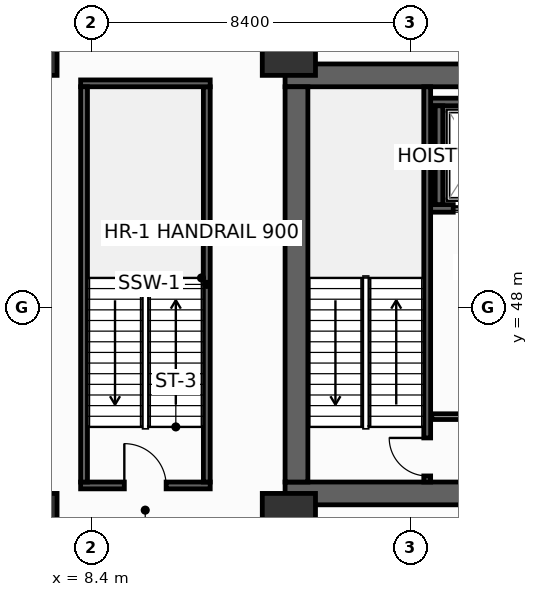
"""IFC4 building model, lengths in metres.
Left out: names, types, materials, properties, quantities, classifications, styles, units other than length and angle.
Written with IfcOpenShell. Run it as: python <this file> out.ifc"""

import sys

from ifc_helpers import new_model, si_unit, direction, frame, frame_2d, origin, origin_2d, place, context, subcontext, project, spatial, rectangle, hollow_rectangle, extrude, element, fill, save


model = new_model("IFC4")
c1 = context("Model", 3, precision=1e-05, world=origin(), true_north=direction((0.0, 1.0)))
c2 = subcontext(c1, "Body", "Model", "MODEL_VIEW")
j1 = project(units=[si_unit("LENGTHUNIT", "METRE"), si_unit("PLANEANGLEUNIT", "RADIAN")], contexts=[c1])
p1 = place(None, origin())
s1 = spatial("IfcSite", under=j1, at=p1, CompositionType="ELEMENT")
p2 = place(p1, origin())
s2 = spatial("IfcBuilding", under=s1, at=p2, CompositionType="ELEMENT")
p3 = place(p2, frame((0.0, 0.0, 22.2)))
s3 = spatial("IfcBuildingStorey", under=s2, at=p3, CompositionType="ELEMENT", Elevation=22.2)
p4 = place(p3, frame((13.5, 43.1, 0.0), z_axis=(0.0, 0.0, 1.0), x_axis=(1.0, 0.0, 0.0)))
e1 = element("IfcWall", 1, at=p4, inside=s3, PredefinedType="SHEAR", context=c2, shape_type="SweptSolid", body=[
    extrude(rectangle(XDim=32.9, YDim=0.6, at=frame_2d((16.45, 0.0))), origin(), (0.0, 0.0, 1.0), 5.15),
])
p5 = place(p4, frame((5.4, 0.0, 0.0)))
e2 = element("IfcOpeningElement", 2, at=p5, cuts=e1, PredefinedType="OPENING", context=c2, shape_type="SweptSolid", body=[
    extrude(rectangle(XDim=1.1, YDim=2.15, at=frame_2d((0.55, 1.075))), frame((0.0, 0.31, 0.0), z_axis=(0.0, -1.0, 0.0), x_axis=(1.0, 0.0, 0.0)), (0.0, 0.0, 1.0), 0.62),
])
p6 = place(p4, frame((25.6, 0.0, 0.0)))
e3 = element("IfcOpeningElement", 3, at=p6, cuts=e1, PredefinedType="OPENING", context=c2, shape_type="SweptSolid", body=[
    extrude(rectangle(XDim=1.1, YDim=2.15, at=frame_2d((0.55, 1.075))), frame((0.0, 0.31, 0.0), z_axis=(0.0, -1.0, 0.0), x_axis=(1.0, 0.0, 0.0)), (0.0, 0.0, 1.0), 0.62),
])
p7 = place(p3, frame((13.5, 54.1, 0.0), z_axis=(0.0, 0.0, 1.0), x_axis=(1.0, 0.0, 0.0)))
e4 = element("IfcWall", 4, at=p7, inside=s3, PredefinedType="SHEAR", context=c2, shape_type="SweptSolid", body=[
    extrude(rectangle(XDim=32.9, YDim=0.6, at=frame_2d((16.45, 0.0))), origin(), (0.0, 0.0, 1.0), 5.15),
])
p8 = place(p3, frame((13.8, 43.4, 0.0), z_axis=(0.0, 0.0, 1.0), x_axis=(0.0, 1.0, 0.0)))
e5 = element("IfcWall", 5, at=p8, inside=s3, PredefinedType="SHEAR", context=c2, shape_type="SweptSolid", body=[
    extrude(rectangle(XDim=10.4, YDim=0.6, at=frame_2d((5.2, 0.0))), origin(), (0.0, 0.0, 1.0), 5.15),
])
for number, where, z_axis, x_axis in (
    (6, (6.8, 54.8, 0.0), (0.0, 0.0, 1.0), (1.0, 0.0, 0.0)),
    (7, (13.6, 54.8, 0.0), (0.0, 0.0, 1.0), (1.0, 0.0, 0.0)),
    (8, (6.8, 42.4, 0.0), (0.0, 0.0, 1.0), (1.0, 0.0, 0.0)),
    (9, (13.6, 42.4, 0.0), (0.0, 0.0, 1.0), (1.0, 0.0, 0.0)),
):
    element("IfcColumn", number, at=place(p3, frame(where, z_axis=z_axis, x_axis=x_axis)), inside=s3, PredefinedType="COLUMN", context=c2, shape_type="SweptSolid", body=[
        extrude(hollow_rectangle(XDim=1.4, YDim=1.4, WallThickness=0.065, at=origin_2d()), origin(), (0.0, 0.0, 1.0), 5.4),
    ])
p9 = place(p3, frame((17.33, 50.6, 0.0), z_axis=(0.0, 0.0, 1.0), x_axis=(1.0, 0.0, 0.0)))
e10 = element("IfcWall", 10, at=p9, inside=s3, PredefinedType="SHEAR", context=c2, shape_type="SweptSolid", body=[
    extrude(rectangle(XDim=2.52, YDim=0.2, at=frame_2d((1.26, 0.0))), origin(), (0.0, 0.0, 1.0), 5.15),
])
p10 = place(p9, frame((0.595, 0.0, 0.0)))
e11 = element("IfcOpeningElement", 11, at=p10, cuts=e10, PredefinedType="OPENING", context=c2, shape_type="SweptSolid", body=[
    extrude(rectangle(XDim=1.25, YDim=2.3, at=frame_2d((0.625, 1.15))), frame((0.0, 0.11, 0.0), z_axis=(0.0, -1.0, 0.0), x_axis=(1.0, 0.0, 0.0)), (0.0, 0.0, 1.0), 0.22),
])
p11 = place(p3, frame((17.33, 53.4, 0.0), z_axis=(0.0, 0.0, 1.0), x_axis=(1.0, 0.0, 0.0)))
e12 = element("IfcWall", 12, at=p11, inside=s3, PredefinedType="SHEAR", context=c2, shape_type="SweptSolid", body=[
    extrude(rectangle(XDim=2.52, YDim=0.2, at=frame_2d((1.26, 0.0))), origin(), (0.0, 0.0, 1.0), 5.15),
])
p12 = place(p3, frame((17.55, 50.7, 0.0), z_axis=(0.0, 0.0, 1.0), x_axis=(0.0, 1.0, 0.0)))
e13 = element("IfcWall", 13, at=p12, inside=s3, PredefinedType="SHEAR", context=c2, shape_type="SweptSolid", body=[
    extrude(rectangle(XDim=2.6, YDim=0.2, at=frame_2d((1.3, 0.0))), origin(), (0.0, 0.0, 1.0), 5.15),
])
p13 = place(p3, frame((17.24, 43.4, 0.0), z_axis=(0.0, 0.0, 1.0), x_axis=(0.0, 1.0, 0.0)))
e14 = element("IfcWall", 14, at=p13, inside=s3, PredefinedType="SHEAR", context=c2, shape_type="SweptSolid", body=[
    extrude(rectangle(XDim=10.4, YDim=0.18, at=frame_2d((5.2, 0.0))), origin(), (0.0, 0.0, 1.0), 5.15),
])
p14 = place(p13, frame((0.16, 0.0, 0.0)))
e15 = element("IfcOpeningElement", 15, at=p14, cuts=e14, PredefinedType="OPENING", context=c2, shape_type="SweptSolid", body=[
    extrude(rectangle(XDim=1.0, YDim=2.15, at=frame_2d((0.5, 1.075))), frame((0.0, 0.1, 0.0), z_axis=(0.0, -1.0, 0.0), x_axis=(1.0, 0.0, 0.0)), (0.0, 0.0, 1.0), 0.2),
])
p15 = place(p3, frame((8.12, 43.31, 0.0), z_axis=(0.0, 0.0, 1.0), x_axis=(1.0, 0.0, 0.0)))
e16 = element("IfcWall", 16, at=p15, inside=s3, PredefinedType="SHEAR", context=c2, shape_type="SweptSolid", body=[
    extrude(rectangle(XDim=3.41, YDim=0.18, at=frame_2d((1.705, 0.0))), origin(), (0.0, 0.0, 1.0), 5.15),
])
p16 = place(p15, frame((1.15, 0.0, 0.0)))
e17 = element("IfcOpeningElement", 17, at=p16, cuts=e16, PredefinedType="OPENING", context=c2, shape_type="SweptSolid", body=[
    extrude(rectangle(XDim=1.1, YDim=2.15, at=frame_2d((0.55, 1.075))), frame((0.0, 0.1, 0.0), z_axis=(0.0, -1.0, 0.0), x_axis=(1.0, 0.0, 0.0)), (0.0, 0.0, 1.0), 0.2),
])
p17 = place(p3, frame((11.44, 43.4, 0.0), z_axis=(0.0, 0.0, 1.0), x_axis=(0.0, 1.0, 0.0)))
e18 = element("IfcWall", 18, at=p17, inside=s3, PredefinedType="SHEAR", context=c2, shape_type="SweptSolid", body=[
    extrude(rectangle(XDim=10.4, YDim=0.18, at=frame_2d((5.2, 0.0))), origin(), (0.0, 0.0, 1.0), 5.15),
])
p18 = place(p3, frame((11.53, 53.89, 0.0), z_axis=(0.0, 0.0, 1.0), x_axis=(-1.0, 0.0, 0.0)))
e19 = element("IfcWall", 19, at=p18, inside=s3, PredefinedType="SHEAR", context=c2, shape_type="SweptSolid", body=[
    extrude(rectangle(XDim=3.41, YDim=0.18, at=frame_2d((1.705, 0.0))), origin(), (0.0, 0.0, 1.0), 5.15),
])
p19 = place(p3, frame((8.21, 53.8, 0.0), z_axis=(0.0, 0.0, 1.0), x_axis=(0.0, -1.0, 0.0)))
e20 = element("IfcWall", 20, at=p19, inside=s3, PredefinedType="SHEAR", context=c2, shape_type="SweptSolid", body=[
    extrude(rectangle(XDim=10.4, YDim=0.18, at=frame_2d((5.2, 0.0))), origin(), (0.0, 0.0, 1.0), 5.15),
])
p20 = place(p3, frame((17.36, 45.12, 0.0), z_axis=(0.0, 0.0, 1.0), x_axis=(1.0, 0.0, 0.0)))
e21 = element("IfcWall", 21, at=p20, inside=s3, PredefinedType="PARTITIONING", context=c2, shape_type="SweptSolid", body=[
    extrude(rectangle(XDim=5.14, YDim=0.15, at=frame_2d((2.57, 0.0))), origin(), (0.0, 0.0, 1.0), 5.15),
])
p21 = place(p20, frame((1.8, 0.0, 0.0)))
e22 = element("IfcOpeningElement", 22, at=p21, cuts=e21, PredefinedType="OPENING", context=c2, shape_type="SweptSolid", body=[
    extrude(rectangle(XDim=1.1, YDim=2.15, at=frame_2d((0.55, 1.075))), frame((0.0, 0.085, 0.0), z_axis=(0.0, -1.0, 0.0), x_axis=(1.0, 0.0, 0.0)), (0.0, 0.0, 1.0), 0.17),
])
p22 = place(p10, origin())
e23 = element("IfcDoor", 23, at=p22, inside=s3, OperationType="SLIDING_TO_LEFT", PredefinedType="DOOR", context=c2, shape_type="SweptSolid", body=[
    extrude(rectangle(XDim=1.25, YDim=2.3, at=frame_2d((0.625, 1.15))), frame((0.0, 0.025, 0.0), z_axis=(0.0, -1.0, 0.0), x_axis=(1.0, 0.0, 0.0)), (0.0, 0.0, 1.0), 0.05),
])
fill(e11, e23)
p23 = place(p14, origin())
e24 = element("IfcDoor", 24, at=p23, inside=s3, OperationType="SINGLE_SWING_RIGHT", PredefinedType="DOOR", context=c2, shape_type="SweptSolid", body=[
    extrude(rectangle(XDim=1.0, YDim=2.15, at=frame_2d((0.5, 1.075))), frame((0.0, 0.025, 0.0), z_axis=(0.0, -1.0, 0.0), x_axis=(1.0, 0.0, 0.0)), (0.0, 0.0, 1.0), 0.05),
])
fill(e15, e24)
p24 = place(p16, origin())
e25 = element("IfcDoor", 25, at=p24, inside=s3, OperationType="SINGLE_SWING_LEFT", PredefinedType="DOOR", context=c2, shape_type="SweptSolid", body=[
    extrude(rectangle(XDim=1.1, YDim=2.15, at=frame_2d((0.55, 1.075))), frame((0.0, 0.025, 0.0), z_axis=(0.0, -1.0, 0.0), x_axis=(1.0, 0.0, 0.0)), (0.0, 0.0, 1.0), 0.05),
])
fill(e17, e25)
save(model, sys.argv[1])
